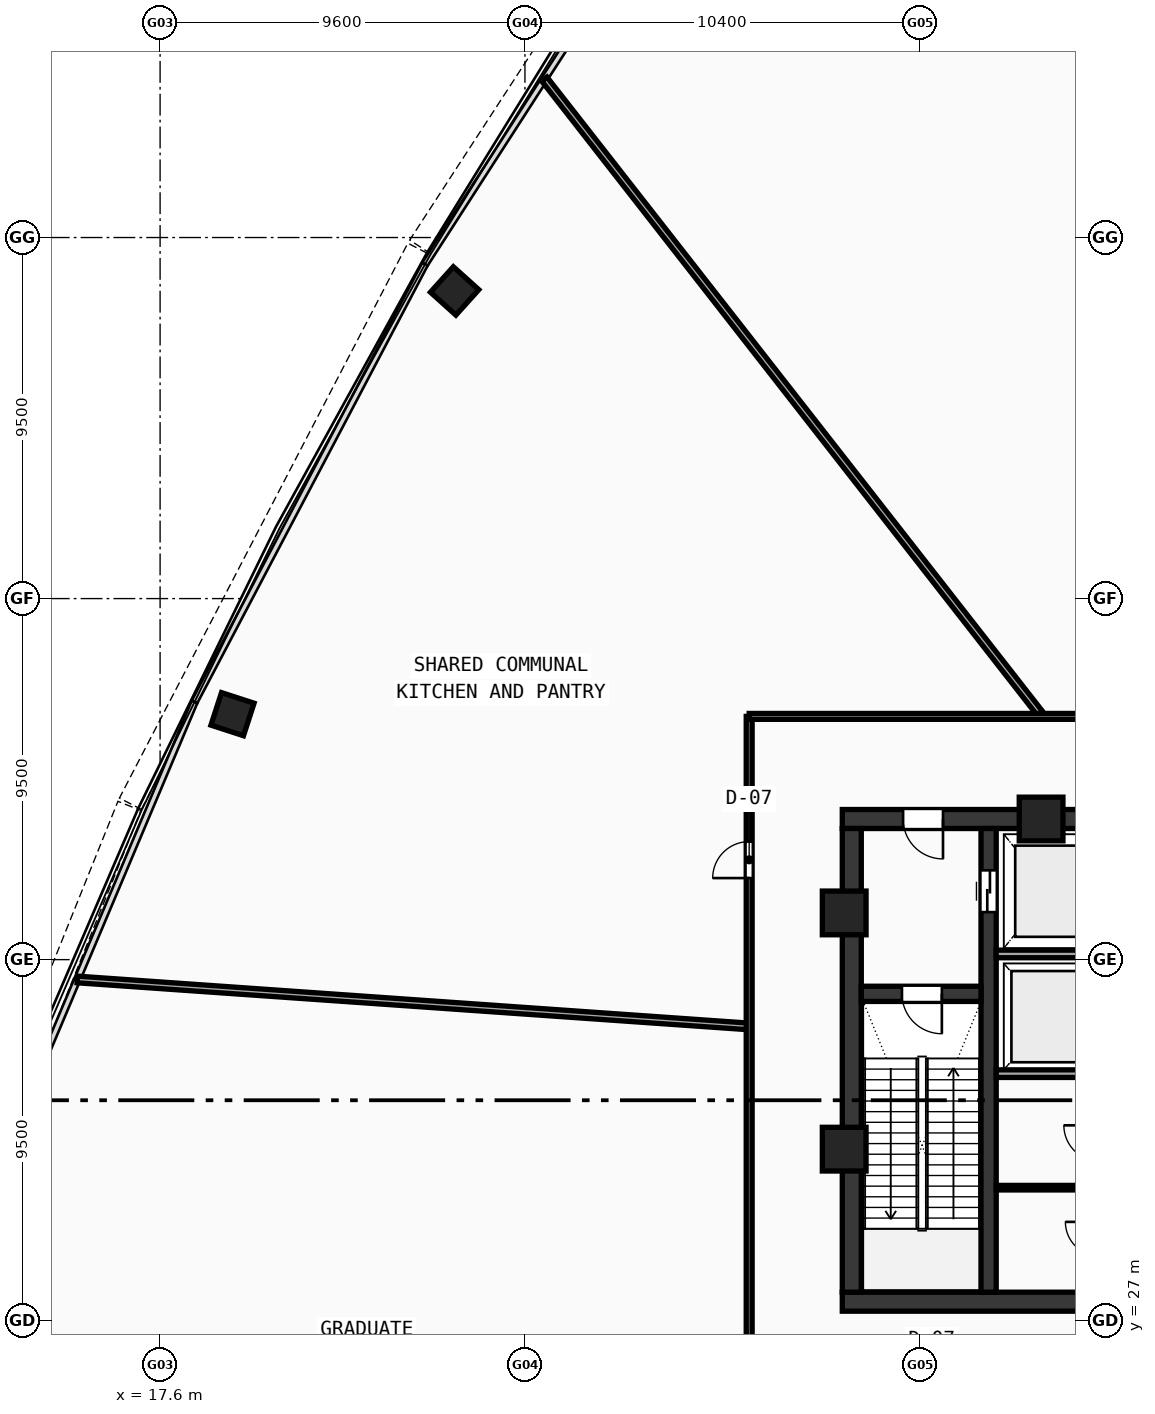
"""IFC4 building model, lengths in metres.
Left out: names, types, materials, properties, quantities, classifications, styles, units other than length and angle.
Written with IfcOpenShell. Run it as: python <this file> out.ifc"""

import sys

from ifc_helpers import new_model, si_unit, direction, frame, frame_2d, origin, origin_with_axes, origin_2d, place, context, subcontext, project, spatial, rectangle, hollow_rectangle, extrude, source, transform, mapped, element, fill, save


model = new_model("IFC4")
c1 = context("Model", 3, precision=1e-05, world=origin(), true_north=direction((0.0, 1.0)))
c2 = subcontext(c1, "Body", "Model", "MODEL_VIEW")
j1 = project(units=[si_unit("LENGTHUNIT", "METRE"), si_unit("PLANEANGLEUNIT", "RADIAN")], contexts=[c1])
p1 = place(None, origin())
s1 = spatial("IfcSite", under=j1, at=p1, CompositionType="ELEMENT")
p2 = place(p1, origin())
s2 = spatial("IfcBuilding", under=s1, at=p2, CompositionType="ELEMENT")
p3 = place(p2, frame((0.0, 0.0, 218.96)))
s3 = spatial("IfcBuildingStorey", under=s2, at=p3, CompositionType="ELEMENT", Elevation=218.96)
p4 = place(p3, frame((35.55, 27.5, 0.0), z_axis=(0.0, 0.0, 1.0), x_axis=(1.0, 0.0, 0.0)))
e1 = element("IfcWall", 1, at=p4, inside=s3, PredefinedType="SHEAR", context=c2, shape_type="SweptSolid", body=[
    extrude(rectangle(XDim=24.9, YDim=0.5, at=frame_2d((12.45, 0.0))), origin(), (0.0, 0.0, 1.0), 5.57),
])
p5 = place(p3, frame((35.55, 40.2, 0.0), z_axis=(0.0, 0.0, 1.0), x_axis=(1.0, 0.0, 0.0)))
e2 = element("IfcWall", 2, at=p5, inside=s3, PredefinedType="SHEAR", context=c2, shape_type="SweptSolid", body=[
    extrude(rectangle(XDim=11.25, YDim=0.5, at=frame_2d((5.625, 0.0))), origin(), (0.0, 0.0, 1.0), 5.57),
])
p6 = place(p5, frame((1.6, 0.0, 0.0)))
e3 = element("IfcOpeningElement", 3, at=p6, cuts=e2, PredefinedType="OPENING", context=c2, shape_type="SweptSolid", body=[
    extrude(rectangle(XDim=1.05, YDim=2.1, at=frame_2d((0.525, 1.05))), frame((0.0, 0.26, 0.0), z_axis=(0.0, -1.0, 0.0), x_axis=(1.0, 0.0, 0.0)), (0.0, 0.0, 1.0), 0.52),
])
p7 = place(p3, frame((35.8, 27.75, 0.0), z_axis=(0.0, 0.0, 1.0), x_axis=(0.0, 1.0, 0.0)))
e4 = element("IfcWall", 4, at=p7, inside=s3, PredefinedType="SHEAR", context=c2, shape_type="SweptSolid", body=[
    extrude(rectangle(XDim=12.2, YDim=0.5, at=frame_2d((6.1, 0.0))), origin(), (0.0, 0.0, 1.0), 5.57),
])
p8 = place(p3, frame((39.4, 27.75, 0.0), z_axis=(0.0, 0.0, 1.0), x_axis=(0.0, 1.0, 0.0)))
e5 = element("IfcWall", 5, at=p8, inside=s3, PredefinedType="SHEAR", context=c2, shape_type="SweptSolid", body=[
    extrude(rectangle(XDim=12.2, YDim=0.4, at=frame_2d((6.1, 0.0))), origin(), (0.0, 0.0, 1.0), 5.57),
])
p9 = place(p8, frame((10.0, 0.0, 0.0)))
e6 = element("IfcOpeningElement", 6, at=p9, cuts=e5, PredefinedType="OPENING", context=c2, shape_type="SweptSolid", body=[
    extrude(rectangle(XDim=1.1, YDim=2.1, at=frame_2d((0.55, 1.05))), frame((0.0, 0.21, 0.0), z_axis=(0.0, -1.0, 0.0), x_axis=(1.0, 0.0, 0.0)), (0.0, 0.0, 1.0), 0.42),
])
p10 = place(p3, frame((36.05, 35.6, 0.0), z_axis=(0.0, 0.0, 1.0), x_axis=(1.0, 0.0, 0.0)))
e7 = element("IfcWall", 7, at=p10, inside=s3, PredefinedType="SHEAR", context=c2, shape_type="SweptSolid", body=[
    extrude(rectangle(XDim=3.15, YDim=0.4, at=frame_2d((1.575, 0.0))), origin(), (0.0, 0.0, 1.0), 5.57),
])
p11 = place(p10, frame((1.07, 0.0, 0.0)))
e8 = element("IfcOpeningElement", 8, at=p11, cuts=e7, PredefinedType="OPENING", context=c2, shape_type="SweptSolid", body=[
    extrude(rectangle(XDim=1.05, YDim=2.1, at=frame_2d((0.525, 1.05))), frame((0.0, 0.21, 0.0), z_axis=(0.0, -1.0, 0.0), x_axis=(1.0, 0.0, 0.0)), (0.0, 0.0, 1.0), 0.42),
])
m1 = source(origin(), c2, "Body", "SweptSolid", [
    extrude(hollow_rectangle(XDim=1.15, YDim=1.15, WallThickness=0.048, at=origin_2d()), origin(), (0.0, 0.0, 1.0), 5.85),
])
for number, where, z_axis, x_axis in (
    (9, (40.781, 40.2, -0.28), (0.0, 0.0, 1.0), (1.0, 0.0, 0.0)),
    (10, (35.6, 37.729, -0.28), (0.0, 0.0, 1.0), (1.0, 0.0, 0.0)),
    (11, (35.6, 31.513, -0.28), (0.0, 0.0, 1.0), (1.0, 0.0, 0.0)),
):
    element("IfcColumn", number, at=place(p3, frame(where, z_axis=z_axis, x_axis=x_axis)), inside=s3, PredefinedType="COLUMN", context=c2, shape_type="MappedRepresentation", body=[
        mapped(m1, transform((0.0, 0.0, 0.0), scale=1.0)),
    ])
m2 = source(origin(), c2, "Body", "SweptSolid", [
    extrude(hollow_rectangle(XDim=0.9, YDim=0.9, WallThickness=0.036, at=origin_2d()), origin(), (0.0, 0.0, 1.0), 5.85),
])
for number, where, z_axis, x_axis in (
    (12, (25.349, 54.095, -0.28), (0.0, 0.0, 1.0), (-0.669, -0.743, 0.0)),
    (13, (19.505, 42.958, -0.28), (0.0, 0.0, 1.0), (-0.309, -0.951, 0.0)),
):
    element("IfcColumn", number, at=place(p3, frame(where, z_axis=z_axis, x_axis=x_axis)), inside=s3, PredefinedType="COLUMN", context=c2, shape_type="MappedRepresentation", body=[
        mapped(m2, transform((0.0, 0.0, 0.0), scale=1.0)),
    ])
for number, where, z_axis, x_axis in (
    (14, (39.6, 36.65, 0.0), (0.0, 0.0, 1.0), (1.0, 0.0, 0.0)),
    (15, (39.6, 33.5, 0.0), (0.0, 0.0, 1.0), (1.0, 0.0, 0.0)),
):
    element("IfcWall", number, at=place(p3, frame(where, z_axis=z_axis, x_axis=x_axis)), inside=s3, PredefinedType="SOLIDWALL", context=c2, shape_type="SweptSolid", body=[
        extrude(rectangle(XDim=2.72, YDim=0.2, at=frame_2d((1.36, 0.0))), origin(), (0.0, 0.0, 1.0), 5.57),
    ])
p12 = place(p3, frame((39.6, 30.5, 0.0), z_axis=(0.0, 0.0, 1.0), x_axis=(1.0, 0.0, 0.0)))
e16 = element("IfcWall", 16, at=p12, inside=s3, PredefinedType="PARTITIONING", context=c2, shape_type="SweptSolid", body=[
    extrude(rectangle(XDim=2.72, YDim=0.12, at=frame_2d((1.36, 0.0))), origin(), (0.0, 0.0, 1.0), 5.57),
])
p13 = place(p3, frame((40.812, 42.9, 0.0), z_axis=(0.0, 0.0, 1.0), x_axis=(-0.615664301783, 0.788008545328, 0.0)))
e17 = element("IfcWall", 17, at=p13, inside=s3, PredefinedType="PARTITIONING", context=c2, shape_type="SweptSolid", body=[
    extrude(rectangle(XDim=21.28, YDim=0.175, at=frame_2d((10.64, 0.0))), origin(), (0.0, 0.0, 1.0), 4.92),
])
p14 = place(p3, frame((33.1, 34.742, 0.0), z_axis=(0.0, 0.0, 1.0), x_axis=(-0.997564635211, 0.069748108048, 0.0)))
e18 = element("IfcWall", 18, at=p14, inside=s3, PredefinedType="PARTITIONING", context=c2, shape_type="SweptSolid", body=[
    extrude(rectangle(XDim=17.722, YDim=0.175, at=frame_2d((8.861, 0.0))), origin(), (0.0, 0.0, 1.0), 4.92),
])
p15 = place(p3, frame((33.1, 24.9, 0.0), z_axis=(0.0, 0.0, 1.0), x_axis=(0.0, 1.0, 0.0)))
e19 = element("IfcWall", 19, at=p15, inside=s3, PredefinedType="PARTITIONING", context=c2, shape_type="SweptSolid", body=[
    extrude(rectangle(XDim=18.0, YDim=0.155, at=frame_2d((9.0, 0.0))), origin(), (0.0, 0.0, 1.0), 2.22),
])
p16 = place(p15, frame((13.746, 0.0, 0.0)))
e20 = element("IfcOpeningElement", 20, at=p16, cuts=e19, PredefinedType="OPENING", context=c2, shape_type="SweptSolid", body=[
    extrude(rectangle(XDim=0.96, YDim=2.12, at=frame_2d((0.48, 1.06))), frame((0.0, 0.087, 0.0), z_axis=(0.0, -1.0, 0.0), x_axis=(1.0, 0.0, 0.0)), (0.0, 0.0, 1.0), 0.175),
])
p17 = place(p3, frame((33.1, 42.9, 0.0), z_axis=(0.0, 0.0, 1.0), x_axis=(1.0, 0.0, 0.0)))
e21 = element("IfcWall", 21, at=p17, inside=s3, PredefinedType="PARTITIONING", context=c2, shape_type="SweptSolid", body=[
    extrude(rectangle(XDim=10.85, YDim=0.155, at=frame_2d((5.425, 0.0))), origin(), (0.0, 0.0, 1.0), 2.22),
])
m3 = source(origin(), c2, "Body", "SweptSolid", [
    extrude(rectangle(XDim=1.05, YDim=2.1, at=frame_2d((0.525, 1.05))), frame((0.0, 0.025, 0.0), z_axis=(0.0, -1.0, 0.0), x_axis=(1.0, 0.0, 0.0)), (0.0, 0.0, 1.0), 0.05),
])
p18 = place(p11, frame((1.05, 0.0, 0.0), z_axis=(0.0, 0.0, 1.0), x_axis=(-1.0, 0.0, 0.0)))
e22 = element("IfcDoor", 22, at=p18, inside=s3, OperationType="SINGLE_SWING_LEFT", PredefinedType="DOOR", context=c2, shape_type="MappedRepresentation", body=[
    mapped(m3, transform((0.0, 0.0, 0.0), scale=1.0)),
])
fill(e8, e22)
p19 = place(p6, frame((1.05, 0.0, 0.0), z_axis=(0.0, 0.0, 1.0), x_axis=(-1.0, 0.0, 0.0)))
e23 = element("IfcDoor", 23, at=p19, inside=s3, OperationType="SINGLE_SWING_LEFT", PredefinedType="DOOR", context=c2, shape_type="MappedRepresentation", body=[
    mapped(m3, transform((0.0, 0.0, 0.0), scale=1.0)),
])
fill(e3, e23)
m4 = source(origin(), c2, "Body", "SweptSolid", [
    extrude(rectangle(XDim=1.1, YDim=2.1, at=frame_2d((0.55, 1.05))), frame((0.0, 0.025, 0.0), z_axis=(0.0, -1.0, 0.0), x_axis=(1.0, 0.0, 0.0)), (0.0, 0.0, 1.0), 0.05),
])
p20 = place(p9, frame((1.1, 0.0, 0.0), z_axis=(0.0, 0.0, 1.0), x_axis=(-1.0, 0.0, 0.0)))
e24 = element("IfcDoor", 24, at=p20, inside=s3, OperationType="DOUBLE_DOOR_SLIDING", PredefinedType="DOOR", context=c2, shape_type="MappedRepresentation", body=[
    mapped(m4, transform((0.0, 0.0, 0.0), scale=1.0)),
])
fill(e6, e24)
m5 = source(origin(), c2, "Body", "SweptSolid", [
    extrude(rectangle(XDim=0.96, YDim=2.12, at=frame_2d((0.48, 1.06))), frame((0.0, 0.025, 0.0), z_axis=(0.0, -1.0, 0.0), x_axis=(1.0, 0.0, 0.0)), (0.0, 0.0, 1.0), 0.05),
])
p21 = place(p16, origin_with_axes())
e25 = element("IfcDoor", 25, at=p21, inside=s3, OperationType="SINGLE_SWING_LEFT", PredefinedType="DOOR", context=c2, shape_type="MappedRepresentation", body=[
    mapped(m5, transform((0.0, 0.0, 0.0), scale=1.0)),
])
fill(e20, e25)
save(model, sys.argv[1])
